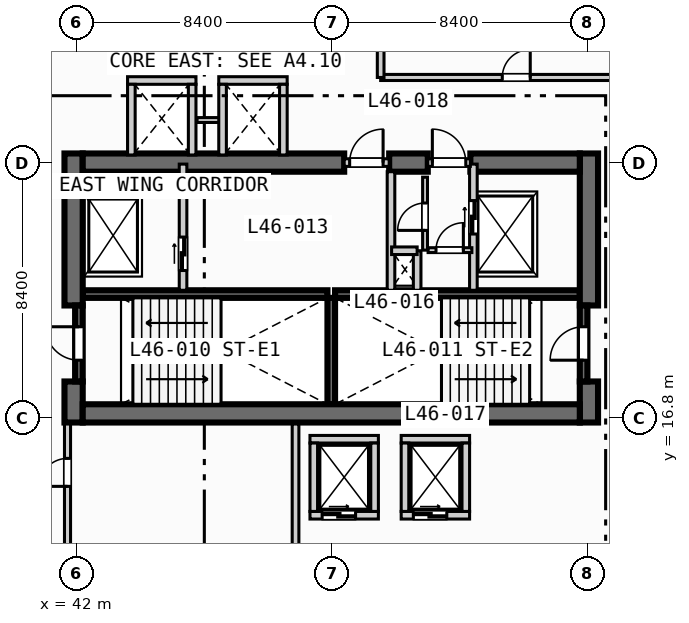
"""IFC4 building model, lengths in metres.
Left out: names, types, materials, properties, quantities, classifications, styles, units other than length and angle.
Written with IfcOpenShell. Run it as: python <this file> out.ifc"""

import sys

from ifc_helpers import new_model, si_unit, direction, frame, frame_2d, origin, place, context, subcontext, project, spatial, rectangle, extrude, element, fill, save


model = new_model("IFC4")
c1 = context("Model", 3, precision=1e-05, world=origin(), true_north=direction((0.0, 1.0)))
c2 = subcontext(c1, "Body", "Model", "MODEL_VIEW")
j1 = project(units=[si_unit("LENGTHUNIT", "METRE"), si_unit("PLANEANGLEUNIT", "RADIAN")], contexts=[c1])
p1 = place(None, origin())
s1 = spatial("IfcSite", under=j1, at=p1, CompositionType="ELEMENT")
p2 = place(p1, origin())
s2 = spatial("IfcBuilding", under=s1, at=p2, CompositionType="ELEMENT")
p3 = place(p2, frame((0.0, 0.0, 190.2)))
s3 = spatial("IfcBuildingStorey", under=s2, at=p3, CompositionType="ELEMENT", Elevation=190.2)
for number, where, z_axis, x_axis in (
    (1, (42.2, 20.875, 0.0), (0.0, 0.0, 1.0), (1.0, 0.0, 0.0)),
    (2, (50.5, 20.875, 0.0), (0.0, 0.0, 1.0), (1.0, 0.0, 0.0)),
):
    element("IfcWall", number, at=place(p3, frame(where, z_axis=z_axis, x_axis=x_axis)), inside=s3, PredefinedType="SOLIDWALL", context=c2, shape_type="SweptSolid", body=[
        extrude(rectangle(XDim=8.05, YDim=0.25, at=frame_2d((4.025, 0.0))), origin(), (0.0, 0.0, 1.0), 3.47),
    ])
p4 = place(p3, frame((50.375, 17.25, 0.0), z_axis=(0.0, 0.0, 1.0), x_axis=(0.0, 1.0, 0.0)))
e3 = element("IfcWall", 3, at=p4, inside=s3, PredefinedType="SOLIDWALL", context=c2, shape_type="SweptSolid", body=[
    extrude(rectangle(XDim=3.5, YDim=0.25, at=frame_2d((1.75, 0.0))), origin(), (0.0, 0.0, 1.0), 3.47),
])
p5 = place(p3, frame((41.9, 16.65, 0.0), z_axis=(0.0, 0.0, 1.0), x_axis=(0.0, 1.0, 0.0)))
e4 = element("IfcWall", 4, at=p5, inside=s3, PredefinedType="SHEAR", context=c2, shape_type="SweptSolid", body=[
    extrude(rectangle(XDim=1.35, YDim=0.6, at=frame_2d((0.675, 0.0))), origin(), (0.0, 0.0, 1.0), 3.47),
])
p6 = place(p3, frame((41.9, 20.5, 0.0), z_axis=(0.0, 0.0, 1.0), x_axis=(0.0, 1.0, 0.0)))
e5 = element("IfcWall", 5, at=p6, inside=s3, PredefinedType="SHEAR", context=c2, shape_type="SweptSolid", body=[
    extrude(rectangle(XDim=5.0, YDim=0.6, at=frame_2d((2.5, 0.0))), origin(), (0.0, 0.0, 1.0), 3.47),
])
p7 = place(p3, frame((58.85, 16.65, 0.0), z_axis=(0.0, 0.0, 1.0), x_axis=(0.0, 1.0, 0.0)))
e6 = element("IfcWall", 6, at=p7, inside=s3, PredefinedType="SHEAR", context=c2, shape_type="SweptSolid", body=[
    extrude(rectangle(XDim=1.35, YDim=0.6, at=frame_2d((0.675, 0.0))), origin(), (0.0, 0.0, 1.0), 3.47),
])
p8 = place(p3, frame((58.85, 20.5, 0.0), z_axis=(0.0, 0.0, 1.0), x_axis=(0.0, 1.0, 0.0)))
e7 = element("IfcWall", 7, at=p8, inside=s3, PredefinedType="SHEAR", context=c2, shape_type="SweptSolid", body=[
    extrude(rectangle(XDim=5.0, YDim=0.6, at=frame_2d((2.5, 0.0))), origin(), (0.0, 0.0, 1.0), 3.47),
])
p9 = place(p3, frame((42.2, 16.95, 0.0), z_axis=(0.0, 0.0, 1.0), x_axis=(1.0, 0.0, 0.0)))
e8 = element("IfcWall", 8, at=p9, inside=s3, PredefinedType="SHEAR", context=c2, shape_type="SweptSolid", body=[
    extrude(rectangle(XDim=16.35, YDim=0.6, at=frame_2d((8.175, 0.0))), origin(), (0.0, 0.0, 1.0), 3.47),
])
p10 = place(p3, frame((42.2, 25.2, 0.0), z_axis=(0.0, 0.0, 1.0), x_axis=(1.0, 0.0, 0.0)))
e9 = element("IfcWall", 9, at=p10, inside=s3, PredefinedType="SHEAR", context=c2, shape_type="SweptSolid", body=[
    extrude(rectangle(XDim=8.6, YDim=0.6, at=frame_2d((4.3, 0.0))), origin(), (0.0, 0.0, 1.0), 3.47),
])
p11 = place(p3, frame((52.28, 25.2, 0.0), z_axis=(0.0, 0.0, 1.0), x_axis=(1.0, 0.0, 0.0)))
e10 = element("IfcWall", 10, at=p11, inside=s3, PredefinedType="SHEAR", context=c2, shape_type="SweptSolid", body=[
    extrude(rectangle(XDim=1.27, YDim=0.6, at=frame_2d((0.635, 0.0))), origin(), (0.0, 0.0, 1.0), 3.47),
])
p12 = place(p3, frame((54.95, 25.2, 0.0), z_axis=(0.0, 0.0, 1.0), x_axis=(1.0, 0.0, 0.0)))
e11 = element("IfcWall", 11, at=p12, inside=s3, PredefinedType="SHEAR", context=c2, shape_type="SweptSolid", body=[
    extrude(rectangle(XDim=3.6, YDim=0.6, at=frame_2d((1.8, 0.0))), origin(), (0.0, 0.0, 1.0), 3.47),
])
p13 = place(p3, frame((42.075, 18.0, 0.0), z_axis=(0.0, 0.0, 1.0), x_axis=(0.0, 1.0, 0.0)))
e12 = element("IfcWall", 12, at=p13, inside=s3, PredefinedType="SOLIDWALL", context=c2, shape_type="SweptSolid", body=[
    extrude(rectangle(XDim=2.5, YDim=0.25, at=frame_2d((1.25, 0.0))), origin(), (0.0, 0.0, 1.0), 3.47),
])
p14 = place(p13, frame((0.7, 0.0, 0.0)))
e13 = element("IfcOpeningElement", 13, at=p14, cuts=e12, PredefinedType="OPENING", context=c2, shape_type="SweptSolid", body=[
    extrude(rectangle(XDim=1.1, YDim=2.15, at=frame_2d((0.55, 1.075))), frame((0.0, 0.135, 0.0), z_axis=(0.0, -1.0, 0.0), x_axis=(1.0, 0.0, 0.0)), (0.0, 0.0, 1.0), 0.27),
])
p15 = place(p3, frame((58.675, 18.0, 0.0), z_axis=(0.0, 0.0, 1.0), x_axis=(0.0, 1.0, 0.0)))
e14 = element("IfcWall", 14, at=p15, inside=s3, PredefinedType="SOLIDWALL", context=c2, shape_type="SweptSolid", body=[
    extrude(rectangle(XDim=2.5, YDim=0.25, at=frame_2d((1.25, 0.0))), origin(), (0.0, 0.0, 1.0), 3.47),
])
p16 = place(p15, frame((0.7, 0.0, 0.0)))
e15 = element("IfcOpeningElement", 15, at=p16, cuts=e14, PredefinedType="OPENING", context=c2, shape_type="SweptSolid", body=[
    extrude(rectangle(XDim=1.1, YDim=2.15, at=frame_2d((0.55, 1.075))), frame((0.0, 0.135, 0.0), z_axis=(0.0, -1.0, 0.0), x_axis=(1.0, 0.0, 0.0)), (0.0, 0.0, 1.0), 0.27),
])
p17 = place(p3, frame((45.5, 21.0, 0.0), z_axis=(0.0, 0.0, 1.0), x_axis=(0.0, 1.0, 0.0)))
e16 = element("IfcWall", 16, at=p17, inside=s3, PredefinedType="SOLIDWALL", context=c2, shape_type="SweptSolid", body=[
    extrude(rectangle(XDim=4.15, YDim=0.25, at=frame_2d((2.075, 0.0))), origin(), (0.0, 0.0, 1.0), 3.47),
])
p18 = place(p17, frame((0.65, 0.0, 0.0)))
e17 = element("IfcOpeningElement", 17, at=p18, cuts=e16, PredefinedType="OPENING", context=c2, shape_type="SweptSolid", body=[
    extrude(rectangle(XDim=1.1, YDim=2.15, at=frame_2d((0.55, 1.075))), frame((0.0, 0.135, 0.0), z_axis=(0.0, -1.0, 0.0), x_axis=(1.0, 0.0, 0.0)), (0.0, 0.0, 1.0), 0.27),
])
p19 = place(p3, frame((50.8, 25.2, 0.0), z_axis=(0.0, 0.0, 1.0), x_axis=(1.0, 0.0, 0.0)))
e18 = element("IfcWall", 18, at=p19, inside=s3, PredefinedType="SOLIDWALL", context=c2, shape_type="SweptSolid", body=[
    extrude(rectangle(XDim=1.48, YDim=0.25, at=frame_2d((0.74, 0.0))), origin(), (0.0, 0.0, 1.0), 3.47),
])
p20 = place(p19, frame((0.18, 0.0, 0.0)))
e19 = element("IfcOpeningElement", 19, at=p20, cuts=e18, PredefinedType="OPENING", context=c2, shape_type="SweptSolid", body=[
    extrude(rectangle(XDim=1.1, YDim=2.15, at=frame_2d((0.55, 1.075))), frame((0.0, 0.135, 0.0), z_axis=(0.0, -1.0, 0.0), x_axis=(1.0, 0.0, 0.0)), (0.0, 0.0, 1.0), 0.27),
])
p21 = place(p3, frame((52.34, 21.0, 0.0), z_axis=(0.0, 0.0, 1.0), x_axis=(0.0, 1.0, 0.0)))
e20 = element("IfcWall", 20, at=p21, inside=s3, PredefinedType="SOLIDWALL", context=c2, shape_type="SweptSolid", body=[
    extrude(rectangle(XDim=3.9, YDim=0.25, at=frame_2d((1.95, 0.0))), origin(), (0.0, 0.0, 1.0), 3.47),
])
p22 = place(p3, frame((55.05, 21.0, 0.0), z_axis=(0.0, 0.0, 1.0), x_axis=(0.0, 1.0, 0.0)))
e21 = element("IfcWall", 21, at=p22, inside=s3, PredefinedType="SOLIDWALL", context=c2, shape_type="SweptSolid", body=[
    extrude(rectangle(XDim=4.15, YDim=0.25, at=frame_2d((2.075, 0.0))), origin(), (0.0, 0.0, 1.0), 3.47),
])
p23 = place(p22, frame((1.85, 0.0, 0.0)))
e22 = element("IfcOpeningElement", 22, at=p23, cuts=e21, PredefinedType="OPENING", context=c2, shape_type="SweptSolid", body=[
    extrude(rectangle(XDim=1.1, YDim=2.15, at=frame_2d((0.55, 1.075))), frame((0.0, 0.135, 0.0), z_axis=(0.0, -1.0, 0.0), x_axis=(1.0, 0.0, 0.0)), (0.0, 0.0, 1.0), 0.27),
])
p24 = place(p3, frame((53.55, 25.2, 0.0), z_axis=(0.0, 0.0, 1.0), x_axis=(1.0, 0.0, 0.0)))
e23 = element("IfcWall", 23, at=p24, inside=s3, PredefinedType="SOLIDWALL", context=c2, shape_type="SweptSolid", body=[
    extrude(rectangle(XDim=1.4, YDim=0.25, at=frame_2d((0.7, 0.0))), origin(), (0.0, 0.0, 1.0), 3.47),
])
p25 = place(p24, frame((0.15, 0.0, 0.0)))
e24 = element("IfcOpeningElement", 24, at=p25, cuts=e23, PredefinedType="OPENING", context=c2, shape_type="SweptSolid", body=[
    extrude(rectangle(XDim=1.1, YDim=2.15, at=frame_2d((0.55, 1.075))), frame((0.0, 0.135, 0.0), z_axis=(0.0, -1.0, 0.0), x_axis=(1.0, 0.0, 0.0)), (0.0, 0.0, 1.0), 0.27),
])
p26 = place(p3, frame((53.2, 21.0, 0.0), z_axis=(0.0, 0.0, 1.0), x_axis=(0.0, 1.0, 0.0)))
e25 = element("IfcWall", 25, at=p26, inside=s3, PredefinedType="SOLIDWALL", context=c2, shape_type="SweptSolid", body=[
    extrude(rectangle(XDim=1.3, YDim=0.25, at=frame_2d((0.65, 0.0))), origin(), (0.0, 0.0, 1.0), 3.47),
])
p27 = place(p3, frame((52.36, 22.3, 0.0), z_axis=(0.0, 0.0, 1.0), x_axis=(1.0, 0.0, 0.0)))
e26 = element("IfcWall", 26, at=p27, inside=s3, PredefinedType="SOLIDWALL", context=c2, shape_type="SweptSolid", body=[
    extrude(rectangle(XDim=0.84, YDim=0.25, at=frame_2d((0.42, 0.0))), origin(), (0.0, 0.0, 1.0), 3.47),
])
p28 = place(p3, frame((53.56, 22.32, 0.0), z_axis=(0.0, 0.0, 1.0), x_axis=(1.0, 0.0, 0.0)))
e27 = element("IfcWall", 27, at=p28, inside=s3, PredefinedType="PARTITIONING", context=c2, shape_type="SweptSolid", body=[
    extrude(rectangle(XDim=1.44, YDim=0.16, at=frame_2d((0.72, 0.0))), origin(), (0.0, 0.0, 1.0), 3.47),
])
p29 = place(p28, frame((0.26, 0.0, 0.0)))
e28 = element("IfcOpeningElement", 28, at=p29, cuts=e27, PredefinedType="OPENING", context=c2, shape_type="SweptSolid", body=[
    extrude(rectangle(XDim=0.9, YDim=2.1, at=frame_2d((0.45, 1.05))), frame((0.0, 0.09, 0.0), z_axis=(0.0, -1.0, 0.0), x_axis=(1.0, 0.0, 0.0)), (0.0, 0.0, 1.0), 0.18),
])
p30 = place(p3, frame((53.46, 22.32, 0.0), z_axis=(0.0, 0.0, 1.0), x_axis=(0.0, 1.0, 0.0)))
e29 = element("IfcWall", 29, at=p30, inside=s3, PredefinedType="PARTITIONING", context=c2, shape_type="SweptSolid", body=[
    extrude(rectangle(XDim=2.4, YDim=0.16, at=frame_2d((1.2, 0.0))), origin(), (0.0, 0.0, 1.0), 3.47),
])
p31 = place(p30, frame((0.65, 0.0, 0.0)))
e30 = element("IfcOpeningElement", 30, at=p31, cuts=e29, PredefinedType="OPENING", context=c2, shape_type="SweptSolid", body=[
    extrude(rectangle(XDim=0.9, YDim=2.1, at=frame_2d((0.45, 1.05))), frame((0.0, 0.09, 0.0), z_axis=(0.0, -1.0, 0.0), x_axis=(1.0, 0.0, 0.0)), (0.0, 0.0, 1.0), 0.18),
])
p32 = place(p3, frame((49.675, 13.6, 0.0), z_axis=(0.0, 0.0, 1.0), x_axis=(1.0, 0.0, 0.0)))
e31 = element("IfcWall", 31, at=p32, inside=s3, PredefinedType="SOLIDWALL", context=c2, shape_type="SweptSolid", body=[
    extrude(rectangle(XDim=2.25, YDim=0.25, at=frame_2d((1.125, 0.0))), origin(), (0.0, 0.0, 1.0), 3.47),
])
p33 = place(p32, frame((0.4, 0.0, 0.0)))
e32 = element("IfcOpeningElement", 32, at=p33, cuts=e31, PredefinedType="OPENING", context=c2, shape_type="SweptSolid", body=[
    extrude(rectangle(XDim=1.1, YDim=2.15, at=frame_2d((0.55, 1.075))), frame((0.0, 0.135, 0.0), z_axis=(0.0, -1.0, 0.0), x_axis=(1.0, 0.0, 0.0)), (0.0, 0.0, 1.0), 0.27),
])
for number, where, z_axis, x_axis in (
    (33, (49.675, 16.1, 0.0), (0.0, 0.0, 1.0), (1.0, 0.0, 0.0)),
    (34, (49.8, 13.725, 0.0), (0.0, 0.0, 1.0), (0.0, 1.0, 0.0)),
    (35, (51.8, 13.725, 0.0), (0.0, 0.0, 1.0), (0.0, 1.0, 0.0)),
):
    element("IfcWall", number, at=place(p3, frame(where, z_axis=z_axis, x_axis=x_axis)), inside=s3, PredefinedType="SOLIDWALL", context=c2, shape_type="SweptSolid", body=[
        extrude(rectangle(XDim=2.25, YDim=0.25, at=frame_2d((1.125, 0.0))), origin(), (0.0, 0.0, 1.0), 3.47),
    ])
p34 = place(p3, frame((52.675, 13.6, 0.0), z_axis=(0.0, 0.0, 1.0), x_axis=(1.0, 0.0, 0.0)))
e36 = element("IfcWall", 36, at=p34, inside=s3, PredefinedType="SOLIDWALL", context=c2, shape_type="SweptSolid", body=[
    extrude(rectangle(XDim=2.25, YDim=0.25, at=frame_2d((1.125, 0.0))), origin(), (0.0, 0.0, 1.0), 3.47),
])
p35 = place(p34, frame((0.4, 0.0, 0.0)))
e37 = element("IfcOpeningElement", 37, at=p35, cuts=e36, PredefinedType="OPENING", context=c2, shape_type="SweptSolid", body=[
    extrude(rectangle(XDim=1.1, YDim=2.15, at=frame_2d((0.55, 1.075))), frame((0.0, 0.135, 0.0), z_axis=(0.0, -1.0, 0.0), x_axis=(1.0, 0.0, 0.0)), (0.0, 0.0, 1.0), 0.27),
])
for number, where, z_axis, x_axis in (
    (38, (52.675, 16.1, 0.0), (0.0, 0.0, 1.0), (1.0, 0.0, 0.0)),
    (39, (52.8, 13.725, 0.0), (0.0, 0.0, 1.0), (0.0, 1.0, 0.0)),
    (40, (54.8, 13.725, 0.0), (0.0, 0.0, 1.0), (0.0, 1.0, 0.0)),
    (41, (43.675, 27.9, 0.0), (0.0, 0.0, 1.0), (1.0, 0.0, 0.0)),
):
    element("IfcWall", number, at=place(p3, frame(where, z_axis=z_axis, x_axis=x_axis)), inside=s3, PredefinedType="SOLIDWALL", context=c2, shape_type="SweptSolid", body=[
        extrude(rectangle(XDim=2.25, YDim=0.25, at=frame_2d((1.125, 0.0))), origin(), (0.0, 0.0, 1.0), 3.47),
    ])
for number, where, z_axis, x_axis in (
    (42, (43.8, 25.45, 0.0), (0.0, 0.0, 1.0), (0.0, 1.0, 0.0)),
    (43, (45.8, 25.45, 0.0), (0.0, 0.0, 1.0), (0.0, 1.0, 0.0)),
):
    element("IfcWall", number, at=place(p3, frame(where, z_axis=z_axis, x_axis=x_axis)), inside=s3, PredefinedType="SOLIDWALL", context=c2, shape_type="SweptSolid", body=[
        extrude(rectangle(XDim=2.325, YDim=0.25, at=frame_2d((1.163, 0.0))), origin(), (0.0, 0.0, 1.0), 3.47),
    ])
p36 = place(p3, frame((45.96, 26.6, 0.0), z_axis=(0.0, 0.0, 1.0), x_axis=(1.0, 0.0, 0.0)))
e44 = element("IfcWall", 44, at=p36, inside=s3, PredefinedType="PARTITIONING", context=c2, shape_type="SweptSolid", body=[
    extrude(rectangle(XDim=0.88, YDim=0.16, at=frame_2d((0.44, 0.0))), origin(), (0.0, 0.0, 1.0), 3.47),
])
p37 = place(p3, frame((46.675, 27.9, 0.0), z_axis=(0.0, 0.0, 1.0), x_axis=(1.0, 0.0, 0.0)))
e45 = element("IfcWall", 45, at=p37, inside=s3, PredefinedType="SOLIDWALL", context=c2, shape_type="SweptSolid", body=[
    extrude(rectangle(XDim=2.25, YDim=0.25, at=frame_2d((1.125, 0.0))), origin(), (0.0, 0.0, 1.0), 3.47),
])
for number, where, z_axis, x_axis in (
    (46, (46.8, 25.45, 0.0), (0.0, 0.0, 1.0), (0.0, 1.0, 0.0)),
    (47, (48.8, 25.45, 0.0), (0.0, 0.0, 1.0), (0.0, 1.0, 0.0)),
):
    element("IfcWall", number, at=place(p3, frame(where, z_axis=z_axis, x_axis=x_axis)), inside=s3, PredefinedType="SOLIDWALL", context=c2, shape_type="SweptSolid", body=[
        extrude(rectangle(XDim=2.325, YDim=0.25, at=frame_2d((1.163, 0.0))), origin(), (0.0, 0.0, 1.0), 3.47),
    ])
p38 = place(p3, frame((41.7, 0.35, 0.0), z_axis=(0.0, 0.0, 1.0), x_axis=(0.0, 1.0, 0.0)))
e48 = element("IfcWall", 48, at=p38, inside=s3, PredefinedType="PARTITIONING", context=c2, shape_type="SweptSolid", body=[
    extrude(rectangle(XDim=16.25, YDim=0.2, at=frame_2d((8.125, 0.0))), origin(), (0.0, 0.0, 1.0), 2.82),
])
p39 = place(p38, frame((14.2, 0.0, 0.0)))
e49 = element("IfcOpeningElement", 49, at=p39, cuts=e48, PredefinedType="OPENING", context=c2, shape_type="SweptSolid", body=[
    extrude(rectangle(XDim=0.92, YDim=2.1, at=frame_2d((0.46, 1.05))), frame((0.0, 0.11, 0.0), z_axis=(0.0, -1.0, 0.0), x_axis=(1.0, 0.0, 0.0)), (0.0, 0.0, 1.0), 0.22),
])
p40 = place(p3, frame((49.2, 0.35, 0.0), z_axis=(0.0, 0.0, 1.0), x_axis=(0.0, 1.0, 0.0)))
e50 = element("IfcWall", 50, at=p40, inside=s3, PredefinedType="PARTITIONING", context=c2, shape_type="SweptSolid", body=[
    extrude(rectangle(XDim=16.25, YDim=0.22, at=frame_2d((8.125, 0.0))), origin(), (0.0, 0.0, 1.0), 3.47),
])
p41 = place(p3, frame((52.0, 28.0, 0.0), z_axis=(0.0, 0.0, 1.0), x_axis=(1.0, 0.0, 0.0)))
e51 = element("IfcWall", 51, at=p41, inside=s3, PredefinedType="PARTITIONING", context=c2, shape_type="SweptSolid", body=[
    extrude(rectangle(XDim=23.25, YDim=0.2, at=frame_2d((11.625, 0.0))), origin(), (0.0, 0.0, 1.0), 3.47),
])
p42 = place(p41, frame((4.0, 0.0, 0.0)))
e52 = element("IfcOpeningElement", 52, at=p42, cuts=e51, PredefinedType="OPENING", context=c2, shape_type="SweptSolid", body=[
    extrude(rectangle(XDim=0.92, YDim=2.1, at=frame_2d((0.46, 1.05))), frame((0.0, 0.11, 0.0), z_axis=(0.0, -1.0, 0.0), x_axis=(1.0, 0.0, 0.0)), (0.0, 0.0, 1.0), 0.22),
])
p43 = place(p3, frame((52.0, 28.0, 0.0), z_axis=(0.0, 0.0, 1.0), x_axis=(0.0, 1.0, 0.0)))
e53 = element("IfcWall", 53, at=p43, inside=s3, PredefinedType="PARTITIONING", context=c2, shape_type="SweptSolid", body=[
    extrude(rectangle(XDim=5.3, YDim=0.22, at=frame_2d((2.65, 0.0))), origin(), (0.0, 0.0, 1.0), 3.47),
])
p44 = place(p14, origin())
e54 = element("IfcDoor", 54, at=p44, inside=s3, OperationType="SINGLE_SWING_RIGHT", PredefinedType="DOOR", context=c2, shape_type="SweptSolid", body=[
    extrude(rectangle(XDim=1.1, YDim=2.15, at=frame_2d((0.55, 1.075))), frame((0.0, 0.025, 0.0), z_axis=(0.0, -1.0, 0.0), x_axis=(1.0, 0.0, 0.0)), (0.0, 0.0, 1.0), 0.05),
])
fill(e13, e54)
p45 = place(p16, origin())
e55 = element("IfcDoor", 55, at=p45, inside=s3, OperationType="SINGLE_SWING_LEFT", PredefinedType="DOOR", context=c2, shape_type="SweptSolid", body=[
    extrude(rectangle(XDim=1.1, YDim=2.15, at=frame_2d((0.55, 1.075))), frame((0.0, 0.025, 0.0), z_axis=(0.0, -1.0, 0.0), x_axis=(1.0, 0.0, 0.0)), (0.0, 0.0, 1.0), 0.05),
])
fill(e15, e55)
p46 = place(p18, origin())
e56 = element("IfcDoor", 56, at=p46, inside=s3, OperationType="SLIDING_TO_LEFT", PredefinedType="DOOR", context=c2, shape_type="SweptSolid", body=[
    extrude(rectangle(XDim=1.1, YDim=2.15, at=frame_2d((0.55, 1.075))), frame((0.0, 0.025, 0.0), z_axis=(0.0, -1.0, 0.0), x_axis=(1.0, 0.0, 0.0)), (0.0, 0.0, 1.0), 0.05),
])
fill(e17, e56)
p47 = place(p20, origin())
e57 = element("IfcDoor", 57, at=p47, inside=s3, OperationType="SINGLE_SWING_RIGHT", PredefinedType="DOOR", context=c2, shape_type="SweptSolid", body=[
    extrude(rectangle(XDim=1.1, YDim=2.15, at=frame_2d((0.55, 1.075))), frame((0.0, 0.025, 0.0), z_axis=(0.0, -1.0, 0.0), x_axis=(1.0, 0.0, 0.0)), (0.0, 0.0, 1.0), 0.05),
])
fill(e19, e57)
p48 = place(p23, origin())
e58 = element("IfcDoor", 58, at=p48, inside=s3, OperationType="SLIDING_TO_LEFT", PredefinedType="DOOR", context=c2, shape_type="SweptSolid", body=[
    extrude(rectangle(XDim=1.1, YDim=2.15, at=frame_2d((0.55, 1.075))), frame((0.0, 0.025, 0.0), z_axis=(0.0, -1.0, 0.0), x_axis=(1.0, 0.0, 0.0)), (0.0, 0.0, 1.0), 0.05),
])
fill(e22, e58)
p49 = place(p25, origin())
e59 = element("IfcDoor", 59, at=p49, inside=s3, OperationType="SINGLE_SWING_LEFT", PredefinedType="DOOR", context=c2, shape_type="SweptSolid", body=[
    extrude(rectangle(XDim=1.1, YDim=2.15, at=frame_2d((0.55, 1.075))), frame((0.0, 0.025, 0.0), z_axis=(0.0, -1.0, 0.0), x_axis=(1.0, 0.0, 0.0)), (0.0, 0.0, 1.0), 0.05),
])
fill(e24, e59)
p50 = place(p29, origin())
e60 = element("IfcDoor", 60, at=p50, inside=s3, OperationType="SINGLE_SWING_RIGHT", PredefinedType="DOOR", context=c2, shape_type="SweptSolid", body=[
    extrude(rectangle(XDim=0.9, YDim=2.1, at=frame_2d((0.45, 1.05))), frame((0.0, 0.025, 0.0), z_axis=(0.0, -1.0, 0.0), x_axis=(1.0, 0.0, 0.0)), (0.0, 0.0, 1.0), 0.05),
])
fill(e28, e60)
p51 = place(p31, origin())
e61 = element("IfcDoor", 61, at=p51, inside=s3, OperationType="SINGLE_SWING_LEFT", PredefinedType="DOOR", context=c2, shape_type="SweptSolid", body=[
    extrude(rectangle(XDim=0.9, YDim=2.1, at=frame_2d((0.45, 1.05))), frame((0.0, 0.025, 0.0), z_axis=(0.0, -1.0, 0.0), x_axis=(1.0, 0.0, 0.0)), (0.0, 0.0, 1.0), 0.05),
])
fill(e30, e61)
p52 = place(p33, origin())
e62 = element("IfcDoor", 62, at=p52, inside=s3, OperationType="SLIDING_TO_LEFT", PredefinedType="DOOR", context=c2, shape_type="SweptSolid", body=[
    extrude(rectangle(XDim=1.1, YDim=2.15, at=frame_2d((0.55, 1.075))), frame((0.0, 0.025, 0.0), z_axis=(0.0, -1.0, 0.0), x_axis=(1.0, 0.0, 0.0)), (0.0, 0.0, 1.0), 0.05),
])
fill(e32, e62)
p53 = place(p35, origin())
e63 = element("IfcDoor", 63, at=p53, inside=s3, OperationType="SLIDING_TO_LEFT", PredefinedType="DOOR", context=c2, shape_type="SweptSolid", body=[
    extrude(rectangle(XDim=1.1, YDim=2.15, at=frame_2d((0.55, 1.075))), frame((0.0, 0.025, 0.0), z_axis=(0.0, -1.0, 0.0), x_axis=(1.0, 0.0, 0.0)), (0.0, 0.0, 1.0), 0.05),
])
fill(e37, e63)
p54 = place(p39, origin())
e64 = element("IfcDoor", 64, at=p54, inside=s3, OperationType="SINGLE_SWING_LEFT", PredefinedType="DOOR", context=c2, shape_type="SweptSolid", body=[
    extrude(rectangle(XDim=0.92, YDim=2.1, at=frame_2d((0.46, 1.05))), frame((0.0, 0.025, 0.0), z_axis=(0.0, -1.0, 0.0), x_axis=(1.0, 0.0, 0.0)), (0.0, 0.0, 1.0), 0.05),
])
fill(e49, e64)
p55 = place(p42, origin())
e65 = element("IfcDoor", 65, at=p55, inside=s3, OperationType="SINGLE_SWING_RIGHT", PredefinedType="DOOR", context=c2, shape_type="SweptSolid", body=[
    extrude(rectangle(XDim=0.92, YDim=2.1, at=frame_2d((0.46, 1.05))), frame((0.0, 0.025, 0.0), z_axis=(0.0, -1.0, 0.0), x_axis=(1.0, 0.0, 0.0)), (0.0, 0.0, 1.0), 0.05),
])
fill(e52, e65)
save(model, sys.argv[1])
